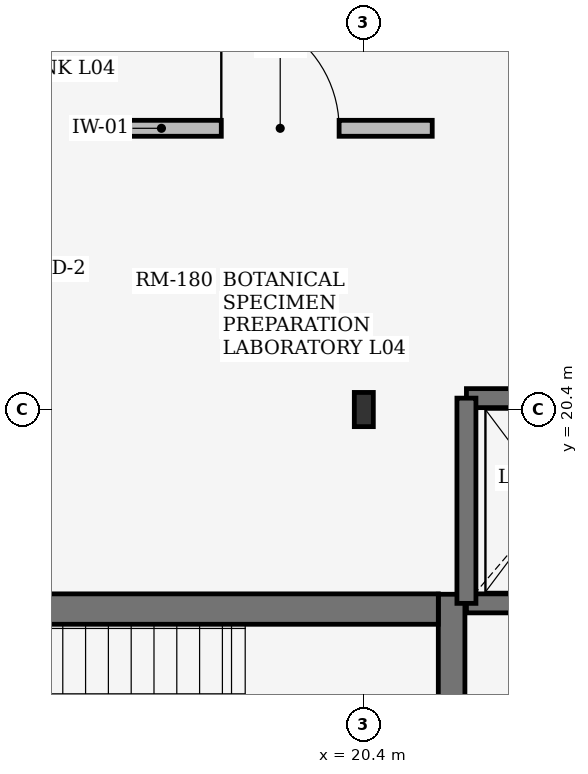
"""IFC4 building model, lengths in metres.
Left out: names, types, materials, properties, quantities, classifications, styles, units other than length and angle.
Written with IfcOpenShell. Run it as: python <this file> out.ifc"""

import sys

from ifc_helpers import new_model, si_unit, direction, frame, frame_2d, origin, origin_2d, place, context, subcontext, project, spatial, rectangle, i_section, extrude, element, fill, save


model = new_model("IFC4")
c1 = context("Model", 3, precision=1e-05, world=origin(), true_north=direction((0.0, 1.0)))
c2 = subcontext(c1, "Body", "Model", "MODEL_VIEW")
j1 = project(units=[si_unit("LENGTHUNIT", "METRE"), si_unit("PLANEANGLEUNIT", "RADIAN")], contexts=[c1])
p1 = place(None, origin())
s1 = spatial("IfcSite", under=j1, at=p1, CompositionType="ELEMENT")
p2 = place(p1, origin())
s2 = spatial("IfcBuilding", under=s1, at=p2, CompositionType="ELEMENT")
p3 = place(p2, frame((0.0, 0.0, 17.1)))
s3 = spatial("IfcBuildingStorey", under=s2, at=p3, CompositionType="ELEMENT", Elevation=17.1)
p4 = place(p3, frame((20.4, 20.4, 0.0), z_axis=(0.0, 0.0, 1.0), x_axis=(1.0, 0.0, 0.0)))
e1 = element("IfcColumn", 1, at=p4, inside=s3, PredefinedType="COLUMN", context=c2, shape_type="SweptSolid", body=[
    extrude(i_section(OverallWidth=0.25, OverallDepth=0.45, WebThickness=0.011, FlangeThickness=0.014, at=origin_2d()), origin(), (0.0, 0.0, 1.0), 3.66),
])
p5 = place(p3, frame((21.555, 13.38, 0.0), z_axis=(0.0, 0.0, 1.0), x_axis=(0.0, 1.0, 0.0)))
e2 = element("IfcWall", 2, at=p5, inside=s3, PredefinedType="SHEAR", context=c2, shape_type="SweptSolid", body=[
    extrude(rectangle(XDim=4.59, YDim=0.35, at=frame_2d((2.295, 0.0))), origin(), (0.0, 0.0, 1.0), 3.66),
])
p6 = place(p3, frame((13.4, 17.775, 0.0), z_axis=(0.0, 0.0, 1.0), x_axis=(1.0, 0.0, 0.0)))
e3 = element("IfcWall", 3, at=p6, inside=s3, PredefinedType="SHEAR", context=c2, shape_type="SweptSolid", body=[
    extrude(rectangle(XDim=7.98, YDim=0.4, at=frame_2d((3.99, 0.0))), origin(), (0.0, 0.0, 1.0), 3.66),
])
p7 = place(p3, frame((21.75, 17.85, 0.0), z_axis=(0.0, 0.0, 1.0), x_axis=(1.0, 0.0, 0.0)))
e4 = element("IfcWall", 4, at=p7, inside=s3, PredefinedType="SHEAR", context=c2, shape_type="SweptSolid", body=[
    extrude(rectangle(XDim=2.3, YDim=0.25, at=frame_2d((1.15, 0.0))), origin(), (0.0, 0.0, 1.0), 3.66),
])
p8 = place(p7, frame((0.6, 0.0, 0.0)))
e5 = element("IfcOpeningElement", 5, at=p8, cuts=e4, PredefinedType="OPENING", context=c2, shape_type="SweptSolid", body=[
    extrude(rectangle(XDim=1.1, YDim=2.2, at=frame_2d((0.55, 1.1))), frame((0.0, 0.135, 0.0), z_axis=(0.0, -1.0, 0.0), x_axis=(1.0, 0.0, 0.0)), (0.0, 0.0, 1.0), 0.27),
])
p9 = place(p3, frame((21.75, 20.55, 0.0), z_axis=(0.0, 0.0, 1.0), x_axis=(1.0, 0.0, 0.0)))
e6 = element("IfcWall", 6, at=p9, inside=s3, PredefinedType="SHEAR", context=c2, shape_type="SweptSolid", body=[
    extrude(rectangle(XDim=2.3, YDim=0.25, at=frame_2d((1.15, 0.0))), origin(), (0.0, 0.0, 1.0), 3.66),
])
p10 = place(p3, frame((21.75, 17.85, 0.0), z_axis=(0.0, 0.0, 1.0), x_axis=(0.0, 1.0, 0.0)))
e7 = element("IfcWall", 7, at=p10, inside=s3, PredefinedType="SHEAR", context=c2, shape_type="SweptSolid", body=[
    extrude(rectangle(XDim=2.7, YDim=0.25, at=frame_2d((1.35, 0.0))), origin(), (0.0, 0.0, 1.0), 3.66),
])
p11 = place(p3, frame((17.3, 24.1, 0.0), z_axis=(0.0, 0.0, 1.0), x_axis=(1.0, 0.0, 0.0)))
e8 = element("IfcWall", 8, at=p11, inside=s3, PredefinedType="PARTITIONING", context=c2, shape_type="SweptSolid", body=[
    extrude(rectangle(XDim=4.0, YDim=0.21, at=frame_2d((2.0, 0.0))), origin(), (0.0, 0.0, 1.0), 3.64),
])
p12 = place(p11, frame((1.225, 0.0, 0.0)))
e9 = element("IfcOpeningElement", 9, at=p12, cuts=e8, PredefinedType="OPENING", context=c2, shape_type="SweptSolid", body=[
    extrude(rectangle(XDim=1.55, YDim=2.25, at=frame_2d((0.775, 1.125))), frame((0.0, 0.115, 0.0), z_axis=(0.0, -1.0, 0.0), x_axis=(1.0, 0.0, 0.0)), (0.0, 0.0, 1.0), 0.23),
])
p13 = place(p12, origin())
e10 = element("IfcDoor", 10, at=p13, inside=s3, OperationType="DOUBLE_DOOR_SINGLE_SWING", PredefinedType="DOOR", context=c2, shape_type="SweptSolid", body=[
    extrude(rectangle(XDim=1.55, YDim=2.25, at=frame_2d((0.775, 1.125))), frame((0.0, 0.025, 0.0), z_axis=(0.0, -1.0, 0.0), x_axis=(1.0, 0.0, 0.0)), (0.0, 0.0, 1.0), 0.05),
])
fill(e9, e10)
save(model, sys.argv[1])
